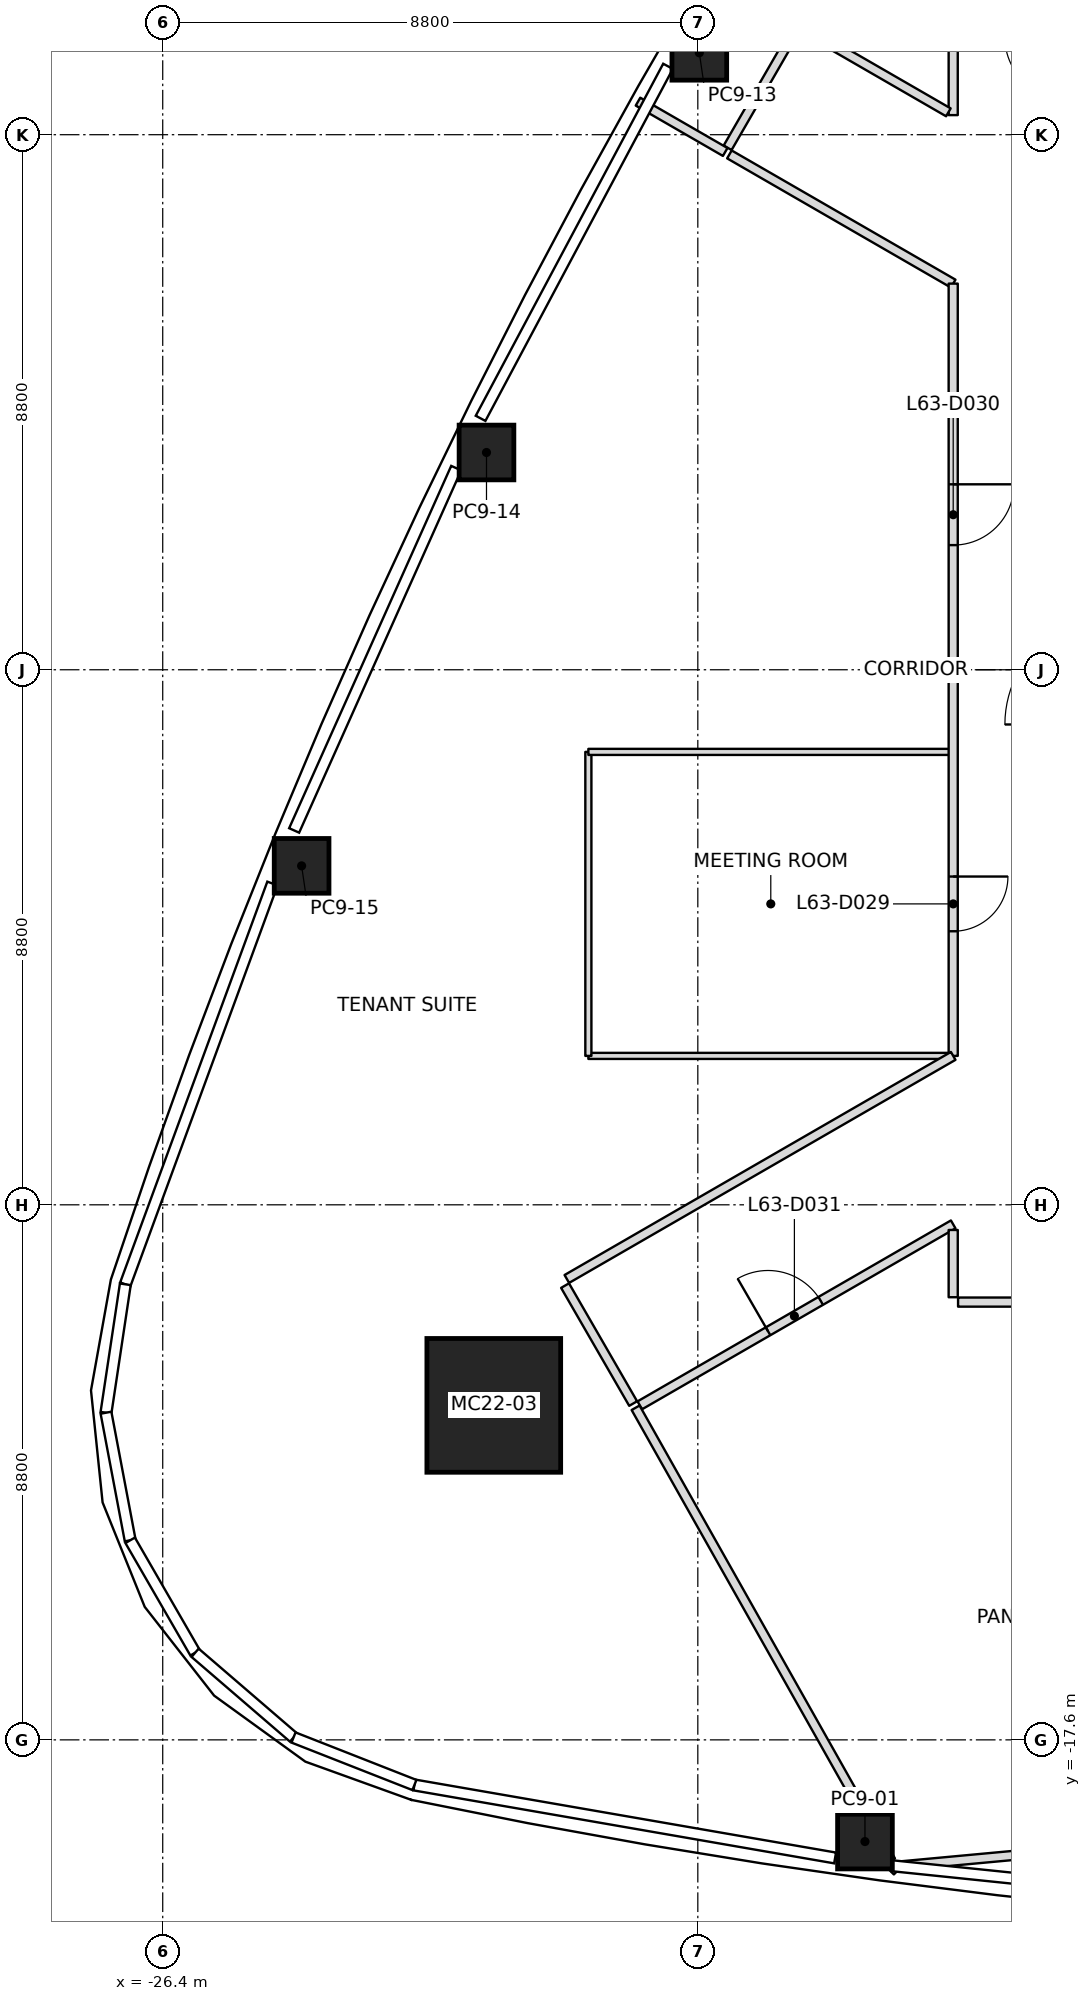
"""IFC4 building model, lengths in metres.
Left out: names, types, materials, properties, quantities, classifications, styles, units other than length and angle.
Written with IfcOpenShell. Run it as: python <this file> out.ifc"""

import sys

from ifc_helpers import new_model, si_unit, direction, frame, frame_2d, origin, origin_2d, place, context, subcontext, project, spatial, rectangle, extrude, element, fill, save


model = new_model("IFC4")
c1 = context("Model", 3, precision=1e-05, world=origin(), true_north=direction((0.0, 1.0)))
c2 = subcontext(c1, "Body", "Model", "MODEL_VIEW")
j1 = project(units=[si_unit("LENGTHUNIT", "METRE"), si_unit("PLANEANGLEUNIT", "RADIAN")], contexts=[c1])
p1 = place(None, origin())
s1 = spatial("IfcSite", under=j1, at=p1, CompositionType="ELEMENT")
p2 = place(p1, origin())
s2 = spatial("IfcBuilding", under=s1, at=p2, CompositionType="ELEMENT")
p3 = place(p2, frame((0.0, 0.0, 279.0)))
s3 = spatial("IfcBuildingStorey", under=s2, at=p3, CompositionType="ELEMENT", Elevation=279.0)
p4 = place(p3, frame((-20.956, -12.099, 0.0), z_axis=(0.027817676907, 0.016043967164, 0.999484250986), x_axis=(0.999613013546, -0.000446478676, -0.027814093645)))
e1 = element("IfcColumn", 1, at=p4, inside=s3, PredefinedType="COLUMN", context=c2, shape_type="SweptSolid", body=[
    extrude(rectangle(XDim=2.2, YDim=2.2, at=origin_2d()), origin(), (0.0, 0.0, 1.0), 4.002),
])
p5 = place(p3, frame((-14.851, -19.272, 0.0), z_axis=(0.017513460473, 0.010373826761, 0.999792809746), x_axis=(-0.990424107913, 0.137136557985, 0.01592642237)))
e2 = element("IfcColumn", 2, at=p5, inside=s3, PredefinedType="COLUMN", context=c2, shape_type="SweptSolid", body=[
    extrude(rectangle(XDim=0.9, YDim=0.9, at=origin_2d()), origin(), (0.0, 0.0, 1.0), 4.001),
])
p6 = place(p3, frame((-17.575, 10.147, 0.0), z_axis=(0.009887049298, -0.00573692984, 0.999934664812), x_axis=(0.499975560967, 0.866039512843, 2.5126546e-05)))
e3 = element("IfcColumn", 3, at=p6, inside=s3, PredefinedType="COLUMN", context=c2, shape_type="SweptSolid", body=[
    extrude(rectangle(XDim=0.9, YDim=0.9, at=origin_2d()), origin(), (0.0, 0.0, 1.0), 4.0),
])
p7 = place(p3, frame((-21.075, 3.573, 0.0), z_axis=(0.014036674448, 0.002013957638, 0.999899452818), x_axis=(0.439329981248, 0.898290343146, -0.00797665265)))
e4 = element("IfcColumn", 4, at=p7, inside=s3, PredefinedType="COLUMN", context=c2, shape_type="SweptSolid", body=[
    extrude(rectangle(XDim=0.9, YDim=0.9, at=origin_2d()), origin(), (0.0, 0.0, 1.0), 4.0),
])
p8 = place(p3, frame((-24.116, -3.225, 0.0), z_axis=(0.017696547774, 0.0099466803, 0.999793926641), x_axis=(0.37661478628, 0.926233823829, -0.015881005939)))
e5 = element("IfcColumn", 5, at=p8, inside=s3, PredefinedType="COLUMN", context=c2, shape_type="SweptSolid", body=[
    extrude(rectangle(XDim=0.9, YDim=0.9, at=origin_2d()), origin(), (0.0, 0.0, 1.0), 4.001),
])
p9 = place(p3, frame((-18.623, -12.138, 0.0), z_axis=(0.0, 0.0, 1.0), x_axis=(0.491162356309, -0.871068045416, 0.0)))
e6 = element("IfcWall", 6, at=p9, inside=s3, PredefinedType="PARTITIONING", context=c2, shape_type="SweptSolid", body=[
    extrude(rectangle(XDim=8.552, YDim=0.15, at=frame_2d((4.276, 0.0))), origin(), (0.0, 0.0, 1.0), 3.45),
])
p10 = place(p3, frame((-17.15, 8.516, 0.0), z_axis=(0.0, 0.0, 1.0), x_axis=(-0.865984256307, 0.50007126275, 0.0)))
e7 = element("IfcWall", 7, at=p10, inside=s3, PredefinedType="PARTITIONING", context=c2, shape_type="SweptSolid", body=[
    extrude(rectangle(XDim=1.656, YDim=0.15, at=frame_2d((0.828, 0.0))), origin(), (0.0, 0.0, 1.0), 3.234),
])
p11 = place(p3, frame((-8.2, -19.11, 0.0), z_axis=(0.0, 0.0, 1.0), x_axis=(-0.995719825194, -0.092423101639, 0.0)))
e8 = element("IfcWall", 8, at=p11, inside=s3, PredefinedType="PARTITIONING", context=c2, shape_type="SweptSolid", body=[
    extrude(rectangle(XDim=6.099, YDim=0.15, at=frame_2d((3.05, 0.0))), origin(), (0.0, 0.0, 1.0), 3.234),
])
p12 = place(p3, frame((-14.323, -19.76, 0.0), z_axis=(0.0, 0.0, 1.0), x_axis=(-0.709632138317, 0.704572372625, 0.0)))
e9 = element("IfcWall", 9, at=p12, inside=s3, PredefinedType="PARTITIONING", context=c2, shape_type="SweptSolid", body=[
    extrude(rectangle(XDim=0.193, YDim=0.15, at=frame_2d((0.097, 0.0))), origin(), (0.0, 0.0, 1.0), 3.45),
])
p13 = place(p3, frame((-19.783, -10.129, 0.0), z_axis=(0.0, 0.0, 1.0), x_axis=(0.500030632641, -0.866007717299, 0.0)))
e10 = element("IfcWall", 10, at=p13, inside=s3, PredefinedType="PARTITIONING", context=c2, shape_type="SweptSolid", body=[
    extrude(rectangle(XDim=2.24, YDim=0.15, at=frame_2d((1.12, 0.0))), origin(), (0.0, 0.0, 1.0), 3.233),
])
p14 = place(p3, frame((-17.08, 8.476, 0.0), z_axis=(0.0, 0.0, 1.0), x_axis=(0.866039217307, -0.499976073514, 0.0)))
e11 = element("IfcWall", 11, at=p14, inside=s3, PredefinedType="PARTITIONING", context=c2, shape_type="SweptSolid", body=[
    extrude(rectangle(XDim=4.25, YDim=0.15, at=frame_2d((2.125, 0.0))), origin(), (0.0, 0.0, 1.0), 3.45),
])
p15 = place(p3, frame((-13.4, 6.351, 0.0), z_axis=(0.0, 0.0, 1.0), x_axis=(0.0, -1.0, 0.0)))
e12 = element("IfcWall", 12, at=p15, inside=s3, PredefinedType="PARTITIONING", context=c2, shape_type="SweptSolid", body=[
    extrude(rectangle(XDim=12.702, YDim=0.15, at=frame_2d((6.351, 0.0))), origin(), (0.0, 0.0, 1.0), 3.317),
])
p16 = place(p15, frame((9.752, 0.0, 0.0)))
e13 = element("IfcOpeningElement", 13, at=p16, cuts=e12, PredefinedType="OPENING", context=c2, shape_type="SweptSolid", body=[
    extrude(rectangle(XDim=0.9, YDim=2.1, at=frame_2d((0.45, 1.05))), frame((0.0, 0.075, 0.0), z_axis=(0.0, -1.0, 0.0), x_axis=(1.0, 0.0, 0.0)), (0.0, 0.0, 1.0), 0.15),
])
p17 = place(p15, frame((3.301, 0.0, 0.0)))
e14 = element("IfcOpeningElement", 14, at=p17, cuts=e12, PredefinedType="OPENING", context=c2, shape_type="SweptSolid", body=[
    extrude(rectangle(XDim=1.0, YDim=2.1, at=frame_2d((0.5, 1.05))), frame((0.0, 0.075, 0.0), z_axis=(0.0, -1.0, 0.0), x_axis=(1.0, 0.0, 0.0)), (0.0, 0.0, 1.0), 0.15),
])
p18 = place(p3, frame((-13.4, -6.351, 0.0), z_axis=(0.0, 0.0, 1.0), x_axis=(-0.866035423939, -0.499982644181, 0.0)))
e15 = element("IfcWall", 15, at=p18, inside=s3, PredefinedType="PARTITIONING", context=c2, shape_type="SweptSolid", body=[
    extrude(rectangle(XDim=7.337, YDim=0.15, at=frame_2d((3.668, 0.0))), origin(), (0.0, 0.0, 1.0), 3.317),
])
p19 = place(p3, frame((-18.554, -12.098, 0.0), z_axis=(0.0, 0.0, 1.0), x_axis=(0.866025739194, 0.499999419053, 0.0)))
e16 = element("IfcWall", 16, at=p19, inside=s3, PredefinedType="PARTITIONING", context=c2, shape_type="SweptSolid", body=[
    extrude(rectangle(XDim=5.952, YDim=0.15, at=frame_2d((2.976, 0.0))), origin(), (0.0, 0.0, 1.0), 3.233),
])
p20 = place(p19, frame((2.436, 0.0, 0.0)))
e17 = element("IfcOpeningElement", 17, at=p20, cuts=e16, PredefinedType="OPENING", context=c2, shape_type="SweptSolid", body=[
    extrude(rectangle(XDim=1.0, YDim=2.1, at=frame_2d((0.5, 1.05))), frame((0.0, 0.075, 0.0), z_axis=(0.0, -1.0, 0.0), x_axis=(1.0, 0.0, 0.0)), (0.0, 0.0, 1.0), 0.15),
])
p21 = place(p3, frame((-13.4, -9.214, 0.0), z_axis=(0.0, 0.0, 1.0), x_axis=(0.0, -1.0, 0.0)))
e18 = element("IfcWall", 18, at=p21, inside=s3, PredefinedType="PARTITIONING", context=c2, shape_type="SweptSolid", body=[
    extrude(rectangle(XDim=1.106, YDim=0.15, at=frame_2d((0.553, 0.0))), origin(), (0.0, 0.0, 1.0), 3.233),
])
p22 = place(p3, frame((-15.99, 10.525, 0.0), z_axis=(0.0, 0.0, 1.0), x_axis=(-0.49994888933, -0.866054910533, 0.0)))
e19 = element("IfcWall", 19, at=p22, inside=s3, PredefinedType="PARTITIONING", context=c2, shape_type="SweptSolid", body=[
    extrude(rectangle(XDim=2.24, YDim=0.15, at=frame_2d((1.12, 0.0))), origin(), (0.0, 0.0, 1.0), 3.45),
])
p23 = place(p3, frame((-13.4, 10.32, 0.0), z_axis=(0.0, 0.0, 1.0), x_axis=(0.0, -1.0, 0.0)))
e20 = element("IfcWall", 20, at=p23, inside=s3, PredefinedType="PARTITIONING", context=c2, shape_type="SweptSolid", body=[
    extrude(rectangle(XDim=1.198, YDim=0.15, at=frame_2d((0.599, 0.0))), origin(), (0.0, 0.0, 1.0), 3.45),
])
p24 = place(p3, frame((-13.479, 9.168, 0.0), z_axis=(0.0, 0.0, 1.0), x_axis=(-0.866034550818, 0.499984156538, 0.0)))
e21 = element("IfcWall", 21, at=p24, inside=s3, PredefinedType="PARTITIONING", context=c2, shape_type="SweptSolid", body=[
    extrude(rectangle(XDim=2.772, YDim=0.15, at=frame_2d((1.386, 0.0))), origin(), (0.0, 0.0, 1.0), 3.45),
])
p25 = place(p3, frame((-13.32, -10.4, 0.0), z_axis=(0.0, 0.0, 1.0), x_axis=(1.0, 0.0, 0.0)))
e22 = element("IfcWall", 22, at=p25, inside=s3, PredefinedType="PARTITIONING", context=c2, shape_type="SweptSolid", body=[
    extrude(rectangle(XDim=12.12, YDim=0.15, at=frame_2d((6.06, 0.0))), origin(), (0.0, 0.0, 1.0), 3.317),
])
p26 = place(p3, frame((-13.46, -6.351, 0.0), z_axis=(0.0, 0.0, 1.0), x_axis=(-1.0, 0.0, 0.0)))
e23 = element("IfcWall", 23, at=p26, inside=s3, PredefinedType="PARTITIONING", context=c2, shape_type="SweptSolid", body=[
    extrude(rectangle(XDim=5.94, YDim=0.1, at=frame_2d((2.97, 0.0))), origin(), (0.0, 0.0, 1.0), 3.317),
])
p27 = place(p3, frame((-19.4, -6.351, 0.0), z_axis=(0.0, 0.0, 1.0), x_axis=(0.0, 1.0, 0.0)))
e24 = element("IfcWall", 24, at=p27, inside=s3, PredefinedType="PARTITIONING", context=c2, shape_type="SweptSolid", body=[
    extrude(rectangle(XDim=5.0, YDim=0.1, at=frame_2d((2.5, 0.0))), origin(), (0.0, 0.0, 1.0), 3.317),
])
p28 = place(p3, frame((-19.4, -1.351, 0.0), z_axis=(0.0, 0.0, 1.0), x_axis=(1.0, 0.0, 0.0)))
e25 = element("IfcWall", 25, at=p28, inside=s3, PredefinedType="PARTITIONING", context=c2, shape_type="SweptSolid", body=[
    extrude(rectangle(XDim=5.97, YDim=0.1, at=frame_2d((2.985, 0.0))), origin(), (0.0, 0.0, 1.0), 3.317),
])
p29 = place(p16, origin())
e26 = element("IfcDoor", 26, at=p29, inside=s3, OperationType="SINGLE_SWING_LEFT", PredefinedType="DOOR", context=c2, shape_type="SweptSolid", body=[
    extrude(rectangle(XDim=0.9, YDim=2.1, at=frame_2d((0.45, 1.05))), frame((0.0, 0.025, 0.0), z_axis=(0.0, -1.0, 0.0), x_axis=(1.0, 0.0, 0.0)), (0.0, 0.0, 1.0), 0.05),
])
fill(e13, e26)
p30 = place(p17, origin())
e27 = element("IfcDoor", 27, at=p30, inside=s3, OperationType="SINGLE_SWING_LEFT", PredefinedType="DOOR", context=c2, shape_type="SweptSolid", body=[
    extrude(rectangle(XDim=1.0, YDim=2.1, at=frame_2d((0.5, 1.05))), frame((0.0, 0.025, 0.0), z_axis=(0.0, -1.0, 0.0), x_axis=(1.0, 0.0, 0.0)), (0.0, 0.0, 1.0), 0.05),
])
fill(e14, e27)
p31 = place(p20, origin())
e28 = element("IfcDoor", 28, at=p31, inside=s3, OperationType="SINGLE_SWING_LEFT", PredefinedType="DOOR", context=c2, shape_type="SweptSolid", body=[
    extrude(rectangle(XDim=1.0, YDim=2.1, at=frame_2d((0.5, 1.05))), frame((0.0, 0.025, 0.0), z_axis=(0.0, -1.0, 0.0), x_axis=(1.0, 0.0, 0.0)), (0.0, 0.0, 1.0), 0.05),
])
fill(e17, e28)
save(model, sys.argv[1])
